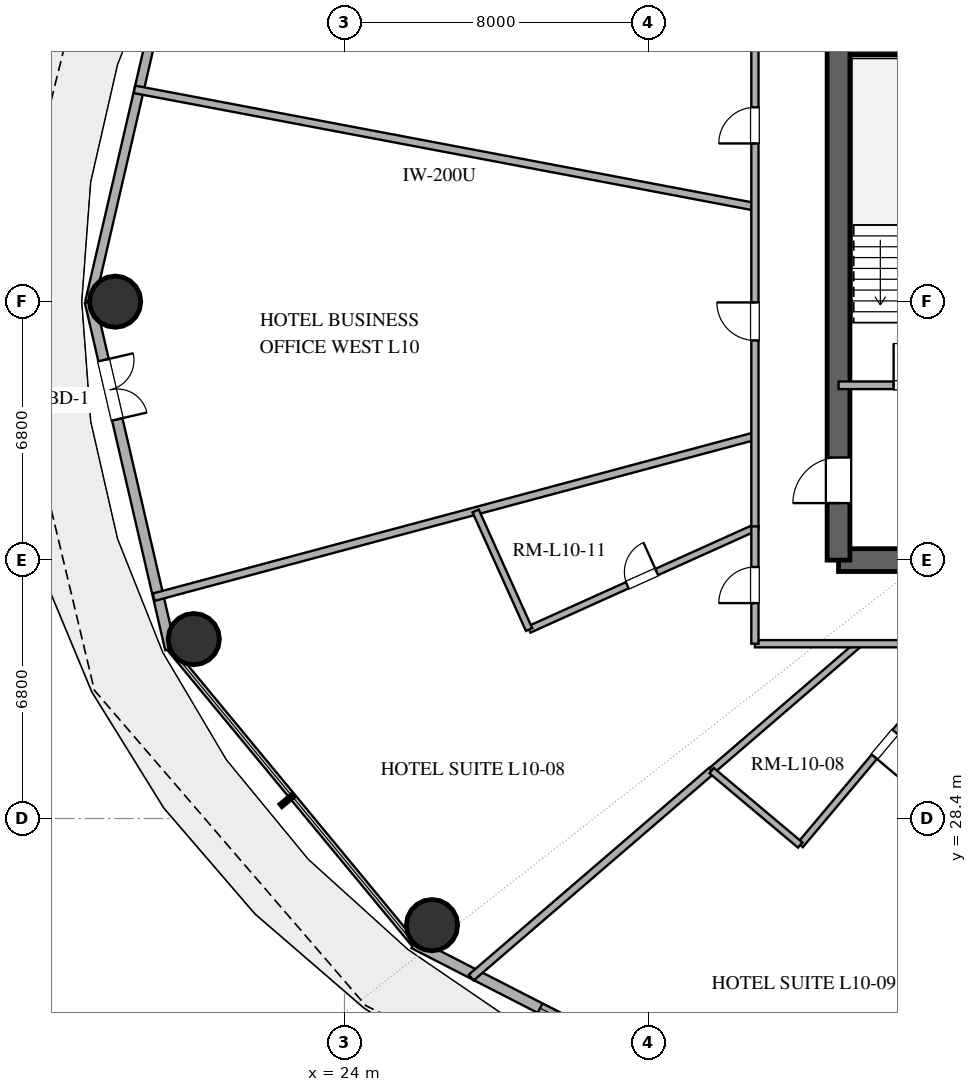
"""IFC4 building model, lengths in metres.
Left out: names, types, materials, properties, quantities, classifications, styles, units other than length and angle.
Written with IfcOpenShell. Run it as: python <this file> out.ifc"""

import sys

from ifc_helpers import new_model, si_unit, direction, frame, frame_2d, origin, origin_2d, place, context, subcontext, project, spatial, rectangle, hollow_circle, extrude, element, fill, save


model = new_model("IFC4")
c1 = context("Model", 3, precision=1e-05, world=origin(), true_north=direction((0.0, 1.0)))
c2 = subcontext(c1, "Body", "Model", "MODEL_VIEW")
j1 = project(units=[si_unit("LENGTHUNIT", "METRE"), si_unit("PLANEANGLEUNIT", "RADIAN")], contexts=[c1])
p1 = place(None, origin())
s1 = spatial("IfcSite", under=j1, at=p1, CompositionType="ELEMENT")
p2 = place(p1, origin())
s2 = spatial("IfcBuilding", under=s1, at=p2, CompositionType="ELEMENT")
p3 = place(p2, frame((0.0, 0.0, 46.2)))
s3 = spatial("IfcBuildingStorey", under=s2, at=p3, CompositionType="ELEMENT", Elevation=46.2)
for number, where, z_axis, x_axis in (
    (1, (37.0, 35.2, 0.0), (0.0, 0.0, 1.0), (1.0, 0.0, 0.0)),
    (2, (37.0, 48.8, 0.0), (0.0, 0.0, 1.0), (1.0, 0.0, 0.0)),
):
    element("IfcWall", number, at=place(p3, frame(where, z_axis=z_axis, x_axis=x_axis)), inside=s3, PredefinedType="SHEAR", context=c2, shape_type="SweptSolid", body=[
        extrude(rectangle(XDim=4.0, YDim=0.6, at=frame_2d((2.0, 0.0))), origin(), (0.0, 0.0, 1.0), 3.38),
    ])
p4 = place(p3, frame((37.0, 35.2, 0.0), z_axis=(0.0, 0.0, 1.0), x_axis=(0.0, 1.0, 0.0)))
e3 = element("IfcWall", 3, at=p4, inside=s3, PredefinedType="SHEAR", context=c2, shape_type="SweptSolid", body=[
    extrude(rectangle(XDim=13.6, YDim=0.6, at=frame_2d((6.8, 0.0))), origin(), (0.0, 0.0, 1.0), 3.38),
])
p5 = place(p4, frame((1.5, 0.0, 0.0)))
e4 = element("IfcOpeningElement", 4, at=p5, cuts=e3, PredefinedType="OPENING", context=c2, shape_type="SweptSolid", body=[
    extrude(rectangle(XDim=1.2, YDim=2.15, at=frame_2d((0.6, 1.075))), frame((0.0, 0.31, 0.0), z_axis=(0.0, -1.0, 0.0), x_axis=(1.0, 0.0, 0.0)), (0.0, 0.0, 1.0), 0.62),
])
for number, where, z_axis, x_axis in (
    (5, (17.965, 42.0, 0.0), (0.0, 0.0, 1.0), (1.0, 0.0, 0.0)),
    (6, (20.034, 33.122, 0.0), (0.0, 0.0, 1.0), (1.0, 0.0, 0.0)),
    (7, (26.303, 25.595, 0.0), (0.0, 0.0, 1.0), (1.0, 0.0, 0.0)),
):
    element("IfcColumn", number, at=place(p3, frame(where, z_axis=z_axis, x_axis=x_axis)), inside=s3, PredefinedType="COLUMN", context=c2, shape_type="SweptSolid", body=[
        extrude(hollow_circle(Radius=0.675, WallThickness=0.036, at=origin_2d()), origin(), (0.0, 0.0, 1.0), 3.38),
    ])
p6 = place(p3, frame((19.419, 51.138, 0.0), z_axis=(0.0, 0.0, 1.0), x_axis=(-0.225454452941, -0.974253709076, 0.0)))
e8 = element("IfcWall", 8, at=p6, inside=s3, PredefinedType="SOLIDWALL", context=c2, shape_type="SweptSolid", body=[
    extrude(rectangle(XDim=9.38, YDim=0.25, at=frame_2d((4.69, 0.0))), origin(), (0.0, 0.0, 1.0), 3.38),
])
p7 = place(p3, frame((17.304, 42.0, 0.0), z_axis=(0.0, 0.0, 1.0), x_axis=(0.225454452941, -0.974253709076, 0.0)))
e9 = element("IfcWall", 9, at=p7, inside=s3, PredefinedType="SOLIDWALL", context=c2, shape_type="SweptSolid", body=[
    extrude(rectangle(XDim=9.38, YDim=0.28, at=frame_2d((4.69, 0.0))), origin(), (0.0, 0.0, 1.0), 3.38),
])
p8 = place(p7, frame((1.579, 0.0, 0.0)))
e10 = element("IfcOpeningElement", 10, at=p8, cuts=e9, PredefinedType="OPENING", context=c2, shape_type="SweptSolid", body=[
    extrude(rectangle(XDim=1.6, YDim=2.25, at=frame_2d((0.8, 1.125))), frame((0.0, 0.15, 0.0), z_axis=(0.0, -1.0, 0.0), x_axis=(1.0, 0.0, 0.0)), (0.0, 0.0, 1.0), 0.3),
])
p9 = place(p3, frame((25.826, 25.114, 0.0), z_axis=(0.0, 0.0, 1.0), x_axis=(0.889853976658, -0.456245438581, 0.0)))
e11 = element("IfcWall", 11, at=p9, inside=s3, PredefinedType="SOLIDWALL", context=c2, shape_type="SweptSolid", body=[
    extrude(rectangle(XDim=11.346, YDim=0.28, at=frame_2d((5.673, 0.0))), origin(), (0.0, 0.0, 1.0), 3.38),
])
p10 = place(p9, frame((3.732, 0.0, 0.85)))
e12 = element("IfcOpeningElement", 12, at=p10, cuts=e11, PredefinedType="OPENING", context=c2, shape_type="SweptSolid", body=[
    extrude(rectangle(XDim=1.35, YDim=1.8, at=frame_2d((0.675, 0.9))), frame((0.0, 0.15, 0.0), z_axis=(0.0, -1.0, 0.0), x_axis=(1.0, 0.0, 0.0)), (0.0, 0.0, 1.0), 0.3),
])
p11 = place(p9, frame((6.811, 0.0, 0.85)))
e13 = element("IfcOpeningElement", 13, at=p11, cuts=e11, PredefinedType="OPENING", context=c2, shape_type="SweptSolid", body=[
    extrude(rectangle(XDim=1.35, YDim=1.8, at=frame_2d((0.675, 0.9))), frame((0.0, 0.15, 0.0), z_axis=(0.0, -1.0, 0.0), x_axis=(1.0, 0.0, 0.0)), (0.0, 0.0, 1.0), 0.3),
])
p12 = place(p3, frame((37.0, 39.8, 0.0), z_axis=(0.0, 0.0, 1.0), x_axis=(1.0, 0.0, 0.0)))
e14 = element("IfcWall", 14, at=p12, inside=s3, PredefinedType="SOLIDWALL", context=c2, shape_type="SweptSolid", body=[
    extrude(rectangle(XDim=4.0, YDim=0.2, at=frame_2d((2.0, 0.0))), origin(), (0.0, 0.0, 1.0), 2.74),
])
p13 = place(p12, frame((1.45, 0.0, 0.0)))
e15 = element("IfcOpeningElement", 15, at=p13, cuts=e14, PredefinedType="OPENING", context=c2, shape_type="SweptSolid", body=[
    extrude(rectangle(XDim=1.1, YDim=2.15, at=frame_2d((0.55, 1.075))), frame((0.0, 0.11, 0.0), z_axis=(0.0, -1.0, 0.0), x_axis=(1.0, 0.0, 0.0)), (0.0, 0.0, 1.0), 0.22),
])
p14 = place(p3, frame((34.8, 44.498, 0.0), z_axis=(0.0, 0.0, 1.0), x_axis=(-0.982565603173, 0.185916205484, 0.0)))
e16 = element("IfcWall", 16, at=p14, inside=s3, PredefinedType="PARTITIONING", context=c2, shape_type="SweptSolid", body=[
    extrude(rectangle(XDim=16.616, YDim=0.2, at=frame_2d((8.308, 0.0))), origin(), (0.0, 0.0, 1.0), 2.74),
])
p15 = place(p3, frame((34.8, 38.463, 0.0), z_axis=(0.0, 0.0, 1.0), x_axis=(-0.965922233104, -0.258832454679, 0.0)))
e17 = element("IfcWall", 17, at=p15, inside=s3, PredefinedType="PARTITIONING", context=c2, shape_type="SweptSolid", body=[
    extrude(rectangle(XDim=16.377, YDim=0.2, at=frame_2d((8.189, 0.0))), origin(), (0.0, 0.0, 1.0), 2.74),
])
p16 = place(p3, frame((27.334, 24.216, 0.0), z_axis=(0.0, 0.0, 1.0), x_axis=(0.757966817992, 0.652293111127, 0.0)))
e18 = element("IfcWall", 18, at=p16, inside=s3, PredefinedType="PARTITIONING", context=c2, shape_type="SweptSolid", body=[
    extrude(rectangle(XDim=8.347, YDim=0.2, at=frame_2d((4.174, 0.0))), origin(), (0.0, 0.0, 1.0), 2.74),
])
p17 = place(p3, frame((44.073, 33.0, 0.0), z_axis=(0.0, 0.0, 1.0), x_axis=(-0.399884283786, -0.916565632991, 0.0)))
e19 = element("IfcWall", 19, at=p17, inside=s3, PredefinedType="PARTITIONING", context=c2, shape_type="SweptSolid", body=[
    extrude(rectangle(XDim=14.749, YDim=0.2, at=frame_2d((7.375, 0.0))), origin(), (0.0, 0.0, 1.0), 2.74),
])
p18 = place(p3, frame((40.44, 33.0, 0.0), z_axis=(0.0, 0.0, 1.0), x_axis=(-0.643154836645, -0.765736153058, 0.0)))
e20 = element("IfcWall", 20, at=p18, inside=s3, PredefinedType="PLUMBINGWALL", context=c2, shape_type="SweptSolid", body=[
    extrude(rectangle(XDim=6.917, YDim=0.18, at=frame_2d((3.458, 0.0))), origin(), (0.0, 0.0, 1.0), 2.74),
])
p19 = place(p18, frame((3.034, 0.0, 0.0)))
e21 = element("IfcOpeningElement", 21, at=p19, cuts=e20, PredefinedType="OPENING", context=c2, shape_type="SweptSolid", body=[
    extrude(rectangle(XDim=0.85, YDim=2.1, at=frame_2d((0.425, 1.05))), frame((0.0, 0.1, 0.0), z_axis=(0.0, -1.0, 0.0), x_axis=(1.0, 0.0, 0.0)), (0.0, 0.0, 1.0), 0.2),
])
p20 = place(p3, frame((28.857, 33.374, 0.0), z_axis=(0.0, 0.0, 1.0), x_axis=(0.911702033518, 0.410852044025, 0.0)))
e22 = element("IfcWall", 22, at=p20, inside=s3, PredefinedType="PLUMBINGWALL", context=c2, shape_type="SweptSolid", body=[
    extrude(rectangle(XDim=6.519, YDim=0.18, at=frame_2d((3.259, 0.0))), origin(), (0.0, 0.0, 1.0), 2.74),
])
p21 = place(p20, frame((2.834, 0.0, 0.0)))
e23 = element("IfcOpeningElement", 23, at=p21, cuts=e22, PredefinedType="OPENING", context=c2, shape_type="SweptSolid", body=[
    extrude(rectangle(XDim=0.85, YDim=2.1, at=frame_2d((0.425, 1.05))), frame((0.0, 0.1, 0.0), z_axis=(0.0, -1.0, 0.0), x_axis=(1.0, 0.0, 0.0)), (0.0, 0.0, 1.0), 0.2),
])
p22 = place(p3, frame((34.8, 36.017, 0.0), z_axis=(0.0, 0.0, 1.0), x_axis=(0.0, 1.0, 0.0)))
e24 = element("IfcWall", 24, at=p22, inside=s3, PredefinedType="PARTITIONING", context=c2, shape_type="SweptSolid", body=[
    extrude(rectangle(XDim=14.983, YDim=0.19, at=frame_2d((7.492, 0.0))), origin(), (0.0, 0.0, 1.0), 2.74),
])
p23 = place(p22, frame((4.963, 0.0, 0.0)))
e25 = element("IfcOpeningElement", 25, at=p23, cuts=e24, PredefinedType="OPENING", context=c2, shape_type="SweptSolid", body=[
    extrude(rectangle(XDim=1.0, YDim=2.2, at=frame_2d((0.5, 1.1))), frame((0.0, 0.105, 0.0), z_axis=(0.0, -1.0, 0.0), x_axis=(1.0, 0.0, 0.0)), (0.0, 0.0, 1.0), 0.21),
])
p24 = place(p22, frame((10.146, 0.0, 0.0)))
e26 = element("IfcOpeningElement", 26, at=p24, cuts=e24, PredefinedType="OPENING", context=c2, shape_type="SweptSolid", body=[
    extrude(rectangle(XDim=0.95, YDim=2.15, at=frame_2d((0.475, 1.075))), frame((0.0, 0.105, 0.0), z_axis=(0.0, -1.0, 0.0), x_axis=(1.0, 0.0, 0.0)), (0.0, 0.0, 1.0), 0.21),
])
p25 = place(p3, frame((33.661, 29.661, 0.0), z_axis=(0.0, 0.0, 1.0), x_axis=(0.757969199921, 0.652290343307, 0.0)))
e27 = element("IfcWall", 27, at=p25, inside=s3, PredefinedType="PLUMBINGWALL", context=c2, shape_type="SweptSolid", body=[
    extrude(rectangle(XDim=5.119, YDim=0.18, at=frame_2d((2.56, 0.0))), origin(), (0.0, 0.0, 1.0), 2.74),
])
p26 = place(p3, frame((44.108, 33.0, 0.0), z_axis=(0.0, 0.0, 1.0), x_axis=(-1.0, 0.0, 0.0)))
e28 = element("IfcWall", 28, at=p26, inside=s3, PredefinedType="PARTITIONING", context=c2, shape_type="SweptSolid", body=[
    extrude(rectangle(XDim=9.308, YDim=0.19, at=frame_2d((4.654, 0.0))), origin(), (0.0, 0.0, 1.0), 2.74),
])
p27 = place(p26, frame((1.38, 0.0, 0.0)))
e29 = element("IfcOpeningElement", 29, at=p27, cuts=e28, PredefinedType="OPENING", context=c2, shape_type="SweptSolid", body=[
    extrude(rectangle(XDim=0.95, YDim=2.15, at=frame_2d((0.475, 1.075))), frame((0.0, 0.105, 0.0), z_axis=(0.0, -1.0, 0.0), x_axis=(1.0, 0.0, 0.0)), (0.0, 0.0, 1.0), 0.21),
])
p28 = place(p3, frame((27.451, 36.494, 0.0), z_axis=(0.0, 0.0, 1.0), x_axis=(0.410839223928, -0.911707810695, 0.0)))
e30 = element("IfcWall", 30, at=p28, inside=s3, PredefinedType="PLUMBINGWALL", context=c2, shape_type="SweptSolid", body=[
    extrude(rectangle(XDim=3.422, YDim=0.18, at=frame_2d((1.711, 0.0))), origin(), (0.0, 0.0, 1.0), 2.74),
])
p29 = place(p3, frame((34.8, 33.0, 0.0), z_axis=(0.0, 0.0, 1.0), x_axis=(0.0, 1.0, 0.0)))
e31 = element("IfcWall", 31, at=p29, inside=s3, PredefinedType="PARTITIONING", context=c2, shape_type="SweptSolid", body=[
    extrude(rectangle(XDim=3.087, YDim=0.19, at=frame_2d((1.543, 0.0))), origin(), (0.0, 0.0, 1.0), 2.74),
])
p30 = place(p29, frame((1.069, 0.0, 0.0)))
e32 = element("IfcOpeningElement", 32, at=p30, cuts=e31, PredefinedType="OPENING", context=c2, shape_type="SweptSolid", body=[
    extrude(rectangle(XDim=0.95, YDim=2.15, at=frame_2d((0.475, 1.075))), frame((0.0, 0.105, 0.0), z_axis=(0.0, -1.0, 0.0), x_axis=(1.0, 0.0, 0.0)), (0.0, 0.0, 1.0), 0.21),
])
p31 = place(p3, frame((35.992, 27.703, 0.0), z_axis=(0.0, 0.0, 1.0), x_axis=(-0.765736471754, 0.643154457208, 0.0)))
e33 = element("IfcWall", 33, at=p31, inside=s3, PredefinedType="PLUMBINGWALL", context=c2, shape_type="SweptSolid", body=[
    extrude(rectangle(XDim=3.043, YDim=0.18, at=frame_2d((1.521, 0.0))), origin(), (0.0, 0.0, 1.0), 2.74),
])
p32 = place(p8, origin())
e34 = element("IfcDoor", 34, at=p32, inside=s3, OperationType="DOUBLE_DOOR_SINGLE_SWING", PredefinedType="DOOR", context=c2, shape_type="SweptSolid", body=[
    extrude(rectangle(XDim=1.6, YDim=2.25, at=frame_2d((0.8, 1.125))), frame((0.0, 0.025, 0.0), z_axis=(0.0, -1.0, 0.0), x_axis=(1.0, 0.0, 0.0)), (0.0, 0.0, 1.0), 0.05),
])
fill(e10, e34)
p33 = place(p10, origin())
e35 = element("IfcWindow", 35, at=p33, inside=s3, PartitioningType="SINGLE_PANEL", PredefinedType="WINDOW", context=c2, shape_type="SweptSolid", body=[
    extrude(rectangle(XDim=1.35, YDim=1.8, at=frame_2d((0.675, 0.9))), frame((0.0, 0.03, 0.0), z_axis=(0.0, -1.0, 0.0), x_axis=(1.0, 0.0, 0.0)), (0.0, 0.0, 1.0), 0.06),
])
fill(e12, e35)
p34 = place(p5, origin())
e36 = element("IfcDoor", 36, at=p34, inside=s3, OperationType="SINGLE_SWING_LEFT", PredefinedType="DOOR", context=c2, shape_type="SweptSolid", body=[
    extrude(rectangle(XDim=1.2, YDim=2.15, at=frame_2d((0.6, 1.075))), frame((0.0, 0.025, 0.0), z_axis=(0.0, -1.0, 0.0), x_axis=(1.0, 0.0, 0.0)), (0.0, 0.0, 1.0), 0.05),
])
fill(e4, e36)
p35 = place(p13, origin())
e37 = element("IfcDoor", 37, at=p35, inside=s3, OperationType="SINGLE_SWING_LEFT", PredefinedType="DOOR", context=c2, shape_type="SweptSolid", body=[
    extrude(rectangle(XDim=1.1, YDim=2.15, at=frame_2d((0.55, 1.075))), frame((0.0, 0.025, 0.0), z_axis=(0.0, -1.0, 0.0), x_axis=(1.0, 0.0, 0.0)), (0.0, 0.0, 1.0), 0.05),
])
fill(e15, e37)
p36 = place(p19, origin())
e38 = element("IfcDoor", 38, at=p36, inside=s3, OperationType="SINGLE_SWING_RIGHT", PredefinedType="DOOR", context=c2, shape_type="SweptSolid", body=[
    extrude(rectangle(XDim=0.85, YDim=2.1, at=frame_2d((0.425, 1.05))), frame((0.0, 0.025, 0.0), z_axis=(0.0, -1.0, 0.0), x_axis=(1.0, 0.0, 0.0)), (0.0, 0.0, 1.0), 0.05),
])
fill(e21, e38)
p37 = place(p21, origin())
e39 = element("IfcDoor", 39, at=p37, inside=s3, OperationType="SINGLE_SWING_RIGHT", PredefinedType="DOOR", context=c2, shape_type="SweptSolid", body=[
    extrude(rectangle(XDim=0.85, YDim=2.1, at=frame_2d((0.425, 1.05))), frame((0.0, 0.025, 0.0), z_axis=(0.0, -1.0, 0.0), x_axis=(1.0, 0.0, 0.0)), (0.0, 0.0, 1.0), 0.05),
])
fill(e23, e39)
p38 = place(p23, origin())
e40 = element("IfcDoor", 40, at=p38, inside=s3, OperationType="SINGLE_SWING_RIGHT", PredefinedType="DOOR", context=c2, shape_type="SweptSolid", body=[
    extrude(rectangle(XDim=1.0, YDim=2.2, at=frame_2d((0.5, 1.1))), frame((0.0, 0.025, 0.0), z_axis=(0.0, -1.0, 0.0), x_axis=(1.0, 0.0, 0.0)), (0.0, 0.0, 1.0), 0.05),
])
fill(e25, e40)
p39 = place(p24, origin())
e41 = element("IfcDoor", 41, at=p39, inside=s3, OperationType="SINGLE_SWING_LEFT", PredefinedType="DOOR", context=c2, shape_type="SweptSolid", body=[
    extrude(rectangle(XDim=0.95, YDim=2.15, at=frame_2d((0.475, 1.075))), frame((0.0, 0.025, 0.0), z_axis=(0.0, -1.0, 0.0), x_axis=(1.0, 0.0, 0.0)), (0.0, 0.0, 1.0), 0.05),
])
fill(e26, e41)
p40 = place(p30, origin())
e42 = element("IfcDoor", 42, at=p40, inside=s3, OperationType="SINGLE_SWING_LEFT", PredefinedType="DOOR", context=c2, shape_type="SweptSolid", body=[
    extrude(rectangle(XDim=0.95, YDim=2.15, at=frame_2d((0.475, 1.075))), frame((0.0, 0.025, 0.0), z_axis=(0.0, -1.0, 0.0), x_axis=(1.0, 0.0, 0.0)), (0.0, 0.0, 1.0), 0.05),
])
fill(e32, e42)
save(model, sys.argv[1])
